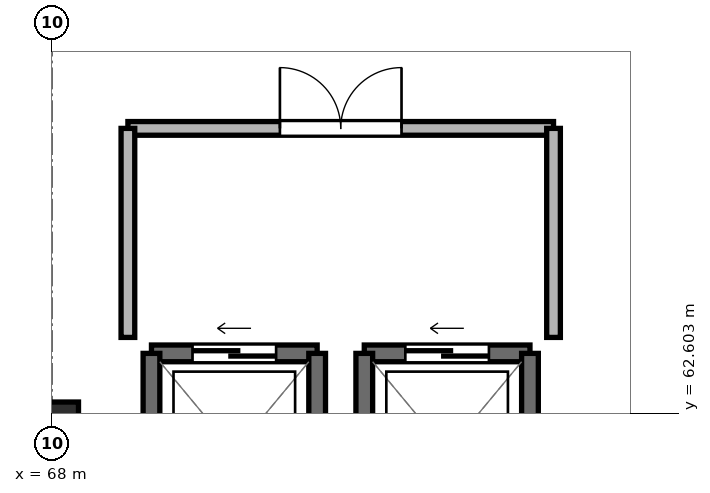
"""IFC4 building model, lengths in metres.
Left out: names, types, materials, properties, quantities, classifications, styles, units other than length and angle.
Written with IfcOpenShell. Run it as: python <this file> out.ifc"""

import sys

from ifc_helpers import new_model, si_unit, direction, frame, frame_2d, origin, origin_2d, place, context, subcontext, project, spatial, rectangle, extrude, element, fill, save


model = new_model("IFC4")
c1 = context("Model", 3, precision=1e-05, world=origin(), true_north=direction((0.0, 1.0)))
c2 = subcontext(c1, "Body", "Model", "MODEL_VIEW")
j1 = project(units=[si_unit("LENGTHUNIT", "METRE"), si_unit("PLANEANGLEUNIT", "RADIAN")], contexts=[c1])
p1 = place(None, origin())
s1 = spatial("IfcSite", under=j1, at=p1, CompositionType="ELEMENT")
p2 = place(p1, origin())
s2 = spatial("IfcBuilding", under=s1, at=p2, CompositionType="ELEMENT")
p3 = place(p2, frame((0.0, 0.0, 53.55)))
s3 = spatial("IfcBuildingStorey", under=s2, at=p3, CompositionType="ELEMENT", Elevation=53.55)
p4 = place(p3, frame((68.0, 62.4, -0.22), z_axis=(0.0, 0.0, 1.0), x_axis=(1.0, 0.0, 0.0)))
e1 = element("IfcColumn", 1, at=p4, inside=s3, PredefinedType="COLUMN", context=c2, shape_type="SweptSolid", body=[
    extrude(rectangle(XDim=0.7, YDim=0.7, at=origin_2d()), origin(), (0.0, 0.0, 1.0), 3.25),
])
p5 = place(p3, frame((71.49, 63.39, 0.0), z_axis=(0.0, 0.0, 1.0), x_axis=(-1.0, 0.0, 0.0)))
e2 = element("IfcWall", 2, at=p5, inside=s3, PredefinedType="SHEAR", context=c2, shape_type="SweptSolid", body=[
    extrude(rectangle(XDim=2.18, YDim=0.22, at=frame_2d((1.09, 0.0))), origin(), (0.0, 0.0, 1.0), 3.03),
])
p6 = place(p5, frame((0.54, 0.0, 0.0)))
e3 = element("IfcOpeningElement", 3, at=p6, cuts=e2, PredefinedType="OPENING", context=c2, shape_type="SweptSolid", body=[
    extrude(rectangle(XDim=1.1, YDim=2.2, at=frame_2d((0.55, 1.1))), frame((0.0, 0.122, 0.0), z_axis=(0.0, -1.0, 0.0), x_axis=(1.0, 0.0, 0.0)), (0.0, 0.0, 1.0), 0.244),
])
for number, where, z_axis, x_axis in (
    (4, (69.31, 63.39, 0.0), (0.0, 0.0, 1.0), (0.0, -1.0, 0.0)),
    (5, (71.49, 60.81, 0.0), (0.0, 0.0, 1.0), (0.0, 1.0, 0.0)),
):
    element("IfcWall", number, at=place(p3, frame(where, z_axis=z_axis, x_axis=x_axis)), inside=s3, PredefinedType="SHEAR", context=c2, shape_type="SweptSolid", body=[
        extrude(rectangle(XDim=2.58, YDim=0.22, at=frame_2d((1.29, 0.0))), origin(), (0.0, 0.0, 1.0), 3.03),
    ])
p7 = place(p3, frame((74.29, 63.39, 0.0), z_axis=(0.0, 0.0, 1.0), x_axis=(-1.0, 0.0, 0.0)))
e6 = element("IfcWall", 6, at=p7, inside=s3, PredefinedType="SHEAR", context=c2, shape_type="SweptSolid", body=[
    extrude(rectangle(XDim=2.18, YDim=0.22, at=frame_2d((1.09, 0.0))), origin(), (0.0, 0.0, 1.0), 3.03),
])
p8 = place(p7, frame((0.54, 0.0, 0.0)))
e7 = element("IfcOpeningElement", 7, at=p8, cuts=e6, PredefinedType="OPENING", context=c2, shape_type="SweptSolid", body=[
    extrude(rectangle(XDim=1.1, YDim=2.2, at=frame_2d((0.55, 1.1))), frame((0.0, 0.122, 0.0), z_axis=(0.0, -1.0, 0.0), x_axis=(1.0, 0.0, 0.0)), (0.0, 0.0, 1.0), 0.244),
])
for number, where, z_axis, x_axis in (
    (8, (72.11, 63.39, 0.0), (0.0, 0.0, 1.0), (0.0, -1.0, 0.0)),
    (9, (74.29, 60.81, 0.0), (0.0, 0.0, 1.0), (0.0, 1.0, 0.0)),
):
    element("IfcWall", number, at=place(p3, frame(where, z_axis=z_axis, x_axis=x_axis)), inside=s3, PredefinedType="SHEAR", context=c2, shape_type="SweptSolid", body=[
        extrude(rectangle(XDim=2.58, YDim=0.22, at=frame_2d((1.29, 0.0))), origin(), (0.0, 0.0, 1.0), 3.03),
    ])
p9 = place(p3, frame((69.0, 66.35, 0.0), z_axis=(0.0, 0.0, 1.0), x_axis=(1.0, 0.0, 0.0)))
e10 = element("IfcWall", 10, at=p9, inside=s3, PredefinedType="PARTITIONING", context=c2, shape_type="SweptSolid", body=[
    extrude(rectangle(XDim=5.6, YDim=0.18, at=frame_2d((2.8, 0.0))), origin(), (0.0, 0.0, 1.0), 2.53),
])
p10 = place(p9, frame((2.0, 0.0, 0.0)))
e11 = element("IfcOpeningElement", 11, at=p10, cuts=e10, PredefinedType="OPENING", context=c2, shape_type="SweptSolid", body=[
    extrude(rectangle(XDim=1.6, YDim=2.2, at=frame_2d((0.8, 1.1))), frame((0.0, 0.102, 0.0), z_axis=(0.0, -1.0, 0.0), x_axis=(1.0, 0.0, 0.0)), (0.0, 0.0, 1.0), 0.204),
])
for number, where, z_axis, x_axis in (
    (12, (69.0, 63.6, 0.0), (0.0, 0.0, 1.0), (0.0, 1.0, 0.0)),
    (13, (74.6, 63.6, 0.0), (0.0, 0.0, 1.0), (0.0, 1.0, 0.0)),
):
    element("IfcWall", number, at=place(p3, frame(where, z_axis=z_axis, x_axis=x_axis)), inside=s3, PredefinedType="PARTITIONING", context=c2, shape_type="SweptSolid", body=[
        extrude(rectangle(XDim=2.75, YDim=0.18, at=frame_2d((1.375, 0.0))), origin(), (0.0, 0.0, 1.0), 2.53),
    ])
p11 = place(p6, origin())
e14 = element("IfcDoor", 14, at=p11, inside=s3, OperationType="SLIDING_TO_RIGHT", PredefinedType="DOOR", context=c2, shape_type="SweptSolid", body=[
    extrude(rectangle(XDim=1.1, YDim=2.2, at=frame_2d((0.55, 1.1))), frame((0.0, 0.025, 0.0), z_axis=(0.0, -1.0, 0.0), x_axis=(1.0, 0.0, 0.0)), (0.0, 0.0, 1.0), 0.05),
])
fill(e3, e14)
p12 = place(p8, origin())
e15 = element("IfcDoor", 15, at=p12, inside=s3, OperationType="SLIDING_TO_RIGHT", PredefinedType="DOOR", context=c2, shape_type="SweptSolid", body=[
    extrude(rectangle(XDim=1.1, YDim=2.2, at=frame_2d((0.55, 1.1))), frame((0.0, 0.025, 0.0), z_axis=(0.0, -1.0, 0.0), x_axis=(1.0, 0.0, 0.0)), (0.0, 0.0, 1.0), 0.05),
])
fill(e7, e15)
p13 = place(p10, origin())
e16 = element("IfcDoor", 16, at=p13, inside=s3, OperationType="DOUBLE_DOOR_SINGLE_SWING", PredefinedType="DOOR", context=c2, shape_type="SweptSolid", body=[
    extrude(rectangle(XDim=1.6, YDim=2.2, at=frame_2d((0.8, 1.1))), frame((0.0, 0.025, 0.0), z_axis=(0.0, -1.0, 0.0), x_axis=(1.0, 0.0, 0.0)), (0.0, 0.0, 1.0), 0.05),
])
fill(e11, e16)
save(model, sys.argv[1])
